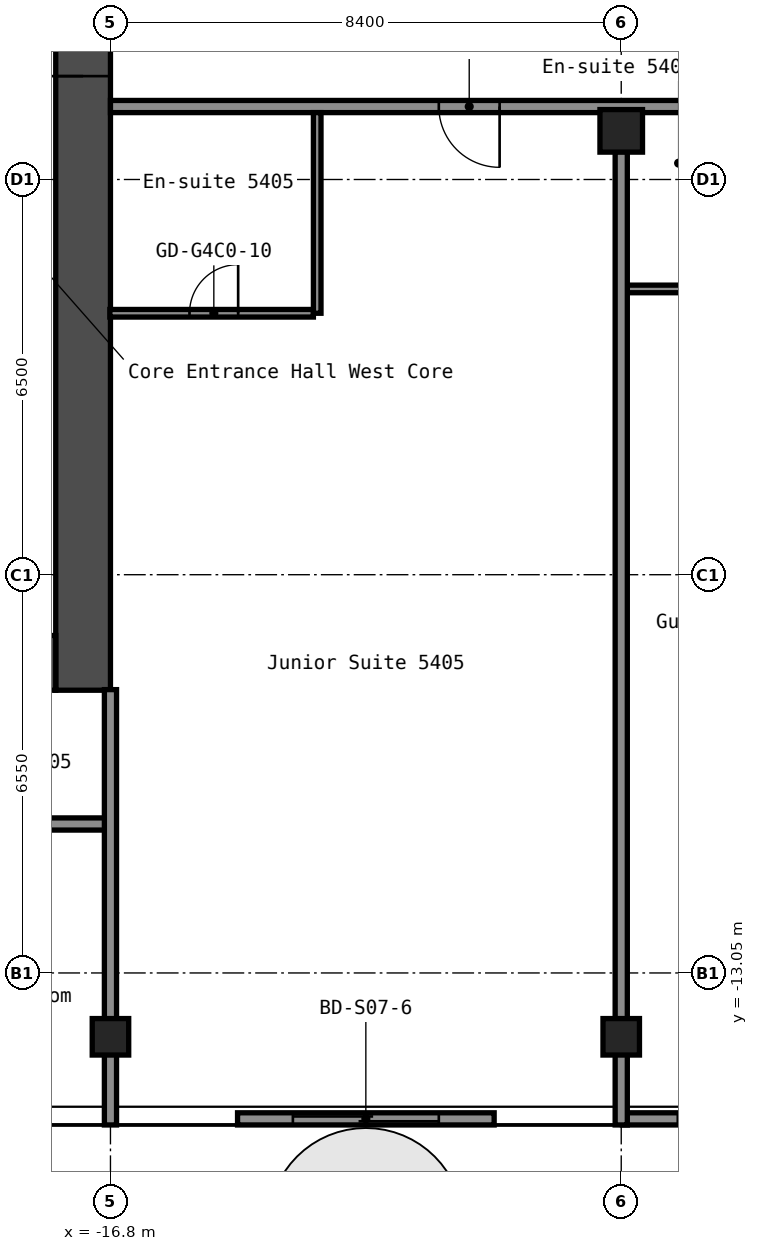
"""IFC4 building model, lengths in metres.
Left out: names, types, materials, properties, quantities, classifications, styles, units other than length and angle.
Written with IfcOpenShell. Run it as: python <this file> out.ifc"""

import sys

from ifc_helpers import new_model, si_unit, direction, frame, frame_2d, origin, origin_2d, place, context, subcontext, project, spatial, rectangle, hollow_rectangle, extrude, element, fill, save


model = new_model("IFC4")
c1 = context("Model", 3, precision=1e-05, world=origin(), true_north=direction((0.0, 1.0)))
c2 = subcontext(c1, "Body", "Model", "MODEL_VIEW")
j1 = project(units=[si_unit("LENGTHUNIT", "METRE"), si_unit("PLANEANGLEUNIT", "RADIAN")], contexts=[c1])
p1 = place(None, origin())
s1 = spatial("IfcSite", under=j1, at=p1, CompositionType="ELEMENT")
p2 = place(p1, origin())
s2 = spatial("IfcBuilding", under=s1, at=p2, CompositionType="ELEMENT")
p3 = place(p2, frame((0.0, 0.0, 193.0)))
s3 = spatial("IfcBuildingStorey", under=s2, at=p3, CompositionType="ELEMENT", Elevation=193.0)
for number, where, z_axis, x_axis in (
    (1, (-16.8, -14.1, 0.0), (0.0, 0.0, 1.0), (1.0, 0.0, 0.0)),
    (2, (-8.4, -14.1, 0.0), (0.0, 0.0, 1.0), (1.0, 0.0, 0.0)),
):
    element("IfcColumn", number, at=place(p3, frame(where, z_axis=z_axis, x_axis=x_axis)), inside=s3, PredefinedType="COLUMN", context=c2, shape_type="SweptSolid", body=[
        extrude(hollow_rectangle(XDim=0.6, YDim=0.6, WallThickness=0.025, InnerFilletRadius=0.038, OuterFilletRadius=0.062, at=origin_2d()), origin(), (0.0, 0.0, 1.0), 2.75),
    ])
p4 = place(p3, frame((-8.4, 0.8, 0.0), z_axis=(0.0, 0.0, 1.0), x_axis=(1.0, 0.0, 0.0)))
e3 = element("IfcColumn", 3, at=p4, inside=s3, PredefinedType="COLUMN", context=c2, shape_type="SweptSolid", body=[
    extrude(hollow_rectangle(XDim=0.7, YDim=0.7, WallThickness=0.028, at=origin_2d()), origin(), (0.0, 0.0, 1.0), 2.75),
])
p5 = place(p3, frame((-17.25, -8.4, 0.0), z_axis=(0.0, 0.0, 1.0), x_axis=(0.0, 1.0, 0.0)))
e4 = element("IfcWall", 4, at=p5, inside=s3, PredefinedType="SHEAR", context=c2, shape_type="SweptSolid", body=[
    extrude(rectangle(XDim=16.8, YDim=0.9, at=frame_2d((8.4, 0.0))), origin(), (0.0, 0.0, 1.0), 2.75),
])
p6 = place(p5, frame((10.1, 0.0, 0.0)))
e5 = element("IfcOpeningElement", 5, at=p6, cuts=e4, PredefinedType="OPENING", context=c2, shape_type="SweptSolid", body=[
    extrude(rectangle(XDim=1.6, YDim=2.1, at=frame_2d((0.8, 1.05))), frame((0.0, 0.46, 0.0), z_axis=(0.0, -1.0, 0.0), x_axis=(1.0, 0.0, 0.0)), (0.0, 0.0, 1.0), 0.92),
])
p7 = place(p3, frame((-32.7, -7.95, 0.0), z_axis=(0.0, 0.0, 1.0), x_axis=(1.0, 0.0, 0.0)))
e6 = element("IfcWall", 6, at=p7, inside=s3, PredefinedType="SHEAR", context=c2, shape_type="SweptSolid", body=[
    extrude(rectangle(XDim=15.0, YDim=0.9, at=frame_2d((7.5, 0.0))), origin(), (0.0, 0.0, 1.0), 2.75),
])
p8 = place(p7, frame((11.45, 0.0, 0.0)))
e7 = element("IfcOpeningElement", 7, at=p8, cuts=e6, PredefinedType="OPENING", context=c2, shape_type="SweptSolid", body=[
    extrude(rectangle(XDim=1.0, YDim=2.1, at=frame_2d((0.5, 1.05))), frame((0.0, 0.46, 0.0), z_axis=(0.0, -1.0, 0.0), x_axis=(1.0, 0.0, 0.0)), (0.0, 0.0, 1.0), 0.92),
])
p9 = place(p3, frame((-38.1, -10.6, 0.0), z_axis=(0.0, 0.0, 1.0), x_axis=(1.0, 0.0, 0.0)))
e8 = element("IfcWall", 8, at=p9, inside=s3, PredefinedType="PARTITIONING", context=c2, shape_type="SweptSolid", body=[
    extrude(rectangle(XDim=21.3, YDim=0.2, at=frame_2d((10.65, 0.0))), origin(), (0.0, 0.0, 1.0), 2.75),
])
p10 = place(p9, frame((1.95, 0.0, 0.0)))
e9 = element("IfcOpeningElement", 9, at=p10, cuts=e8, PredefinedType="OPENING", context=c2, shape_type="SweptSolid", body=[
    extrude(rectangle(XDim=0.9, YDim=2.1, at=frame_2d((0.45, 1.05))), frame((0.0, 0.11, 0.0), z_axis=(0.0, -1.0, 0.0), x_axis=(1.0, 0.0, 0.0)), (0.0, 0.0, 1.0), 0.22),
])
p11 = place(p9, frame((5.815, 0.0, 0.0)))
e10 = element("IfcOpeningElement", 10, at=p11, cuts=e8, PredefinedType="OPENING", context=c2, shape_type="SweptSolid", body=[
    extrude(rectangle(XDim=0.9, YDim=2.1, at=frame_2d((0.45, 1.05))), frame((0.0, 0.11, 0.0), z_axis=(0.0, -1.0, 0.0), x_axis=(1.0, 0.0, 0.0)), (0.0, 0.0, 1.0), 0.22),
])
p12 = place(p9, frame((10.015, 0.0, 0.0)))
e11 = element("IfcOpeningElement", 11, at=p12, cuts=e8, PredefinedType="OPENING", context=c2, shape_type="SweptSolid", body=[
    extrude(rectangle(XDim=0.9, YDim=2.1, at=frame_2d((0.45, 1.05))), frame((0.0, 0.11, 0.0), z_axis=(0.0, -1.0, 0.0), x_axis=(1.0, 0.0, 0.0)), (0.0, 0.0, 1.0), 0.22),
])
p13 = place(p9, frame((15.055, 0.0, 0.0)))
e12 = element("IfcOpeningElement", 12, at=p13, cuts=e8, PredefinedType="OPENING", context=c2, shape_type="SweptSolid", body=[
    extrude(rectangle(XDim=0.9, YDim=2.1, at=frame_2d((0.45, 1.05))), frame((0.0, 0.11, 0.0), z_axis=(0.0, -1.0, 0.0), x_axis=(1.0, 0.0, 0.0)), (0.0, 0.0, 1.0), 0.22),
])
p14 = place(p9, frame((19.255, 0.0, 0.0)))
e13 = element("IfcOpeningElement", 13, at=p14, cuts=e8, PredefinedType="OPENING", context=c2, shape_type="SweptSolid", body=[
    extrude(rectangle(XDim=0.9, YDim=2.1, at=frame_2d((0.45, 1.05))), frame((0.0, 0.11, 0.0), z_axis=(0.0, -1.0, 0.0), x_axis=(1.0, 0.0, 0.0)), (0.0, 0.0, 1.0), 0.22),
])
p15 = place(p3, frame((-16.81, -2.2, 0.0), z_axis=(0.0, 0.0, 1.0), x_axis=(1.0, 0.0, 0.0)))
e14 = element("IfcWall", 14, at=p15, inside=s3, PredefinedType="PARTITIONING", context=c2, shape_type="SweptSolid", body=[
    extrude(rectangle(XDim=3.348, YDim=0.125, at=frame_2d((1.674, 0.0))), origin(), (0.0, 0.0, 1.0), 2.75),
])
p16 = place(p15, frame((1.31, 0.0, 0.0)))
e15 = element("IfcOpeningElement", 15, at=p16, cuts=e14, PredefinedType="OPENING", context=c2, shape_type="SweptSolid", body=[
    extrude(rectangle(XDim=0.8, YDim=2.1, at=frame_2d((0.4, 1.05))), frame((0.0, 0.073, 0.0), z_axis=(0.0, -1.0, 0.0), x_axis=(1.0, 0.0, 0.0)), (0.0, 0.0, 1.0), 0.145),
])
p17 = place(p3, frame((-8.3, -1.8, 0.0), z_axis=(0.0, 0.0, 1.0), x_axis=(1.0, 0.0, 0.0)))
e16 = element("IfcWall", 16, at=p17, inside=s3, PredefinedType="PARTITIONING", context=c2, shape_type="SweptSolid", body=[
    extrude(rectangle(XDim=2.338, YDim=0.125, at=frame_2d((1.169, 0.0))), origin(), (0.0, 0.0, 1.0), 2.75),
])
p18 = place(p3, frame((-16.8, 1.2, 0.0), z_axis=(0.0, 0.0, 1.0), x_axis=(1.0, 0.0, 0.0)))
e17 = element("IfcWall", 17, at=p18, inside=s3, PredefinedType="PARTITIONING", context=c2, shape_type="SweptSolid", body=[
    extrude(rectangle(XDim=33.6, YDim=0.2, at=frame_2d((16.8, 0.0))), origin(), (0.0, 0.0, 1.0), 2.75),
])
p19 = place(p18, frame((5.4, 0.0, 0.0)))
e18 = element("IfcOpeningElement", 18, at=p19, cuts=e17, PredefinedType="OPENING", context=c2, shape_type="SweptSolid", body=[
    extrude(rectangle(XDim=1.0, YDim=2.1, at=frame_2d((0.5, 1.05))), frame((0.0, 0.11, 0.0), z_axis=(0.0, -1.0, 0.0), x_axis=(1.0, 0.0, 0.0)), (0.0, 0.0, 1.0), 0.22),
])
p20 = place(p18, frame((11.25, 0.0, 0.0)))
e19 = element("IfcOpeningElement", 19, at=p20, cuts=e17, PredefinedType="OPENING", context=c2, shape_type="SweptSolid", body=[
    extrude(rectangle(XDim=1.0, YDim=2.1, at=frame_2d((0.5, 1.05))), frame((0.0, 0.11, 0.0), z_axis=(0.0, -1.0, 0.0), x_axis=(1.0, 0.0, 0.0)), (0.0, 0.0, 1.0), 0.22),
])
p21 = place(p18, frame((12.95, 0.0, 0.0)))
e20 = element("IfcOpeningElement", 20, at=p21, cuts=e17, PredefinedType="OPENING", context=c2, shape_type="SweptSolid", body=[
    extrude(rectangle(XDim=1.0, YDim=2.1, at=frame_2d((0.5, 1.05))), frame((0.0, 0.11, 0.0), z_axis=(0.0, -1.0, 0.0), x_axis=(1.0, 0.0, 0.0)), (0.0, 0.0, 1.0), 0.22),
])
p22 = place(p18, frame((18.7, 0.0, 0.0)))
e21 = element("IfcOpeningElement", 21, at=p22, cuts=e17, PredefinedType="OPENING", context=c2, shape_type="SweptSolid", body=[
    extrude(rectangle(XDim=0.9, YDim=2.1, at=frame_2d((0.45, 1.05))), frame((0.0, 0.11, 0.0), z_axis=(0.0, -1.0, 0.0), x_axis=(1.0, 0.0, 0.0)), (0.0, 0.0, 1.0), 0.22),
])
p23 = place(p18, frame((22.9, 0.0, 0.0)))
e22 = element("IfcOpeningElement", 22, at=p23, cuts=e17, PredefinedType="OPENING", context=c2, shape_type="SweptSolid", body=[
    extrude(rectangle(XDim=0.9, YDim=2.1, at=frame_2d((0.45, 1.05))), frame((0.0, 0.11, 0.0), z_axis=(0.0, -1.0, 0.0), x_axis=(1.0, 0.0, 0.0)), (0.0, 0.0, 1.0), 0.22),
])
p24 = place(p18, frame((28.05, 0.0, 0.0)))
e23 = element("IfcOpeningElement", 23, at=p24, cuts=e17, PredefinedType="OPENING", context=c2, shape_type="SweptSolid", body=[
    extrude(rectangle(XDim=1.0, YDim=2.1, at=frame_2d((0.5, 1.05))), frame((0.0, 0.11, 0.0), z_axis=(0.0, -1.0, 0.0), x_axis=(1.0, 0.0, 0.0)), (0.0, 0.0, 1.0), 0.22),
])
p25 = place(p18, frame((29.75, 0.0, 0.0)))
e24 = element("IfcOpeningElement", 24, at=p25, cuts=e17, PredefinedType="OPENING", context=c2, shape_type="SweptSolid", body=[
    extrude(rectangle(XDim=1.0, YDim=2.1, at=frame_2d((0.5, 1.05))), frame((0.0, 0.11, 0.0), z_axis=(0.0, -1.0, 0.0), x_axis=(1.0, 0.0, 0.0)), (0.0, 0.0, 1.0), 0.22),
])
p26 = place(p3, frame((-16.8, -15.55, 0.0), z_axis=(0.0, 0.0, 1.0), x_axis=(0.0, 1.0, 0.0)))
e25 = element("IfcWall", 25, at=p26, inside=s3, PredefinedType="PARTITIONING", context=c2, shape_type="SweptSolid", body=[
    extrude(rectangle(XDim=7.16, YDim=0.2, at=frame_2d((3.58, 0.0))), origin(), (0.0, 0.0, 1.0), 2.75),
])
p27 = place(p3, frame((-13.4, -2.2, 0.0), z_axis=(0.0, 0.0, 1.0), x_axis=(0.0, 1.0, 0.0)))
e26 = element("IfcWall", 26, at=p27, inside=s3, PredefinedType="PARTITIONING", context=c2, shape_type="SweptSolid", body=[
    extrude(rectangle(XDim=3.3, YDim=0.125, at=frame_2d((1.65, 0.0))), origin(), (0.0, 0.0, 1.0), 2.75),
])
p28 = place(p3, frame((-8.4, -15.55, 0.0), z_axis=(0.0, 0.0, 1.0), x_axis=(0.0, 1.0, 0.0)))
e27 = element("IfcWall", 27, at=p28, inside=s3, PredefinedType="PARTITIONING", context=c2, shape_type="SweptSolid", body=[
    extrude(rectangle(XDim=16.01, YDim=0.2, at=frame_2d((8.005, 0.0))), origin(), (0.0, 0.0, 1.0), 2.75),
])
p29 = place(p3, frame((-14.71, -15.45, 0.0), z_axis=(0.0, 0.0, 1.0), x_axis=(1.0, 0.0, 0.0)))
p30 = place(p29, frame((0.91, 0.0, 0.0)))
p31 = place(p30, frame((2.4, 0.0, 0.0), z_axis=(0.0, 0.0, 1.0), x_axis=(-1.0, 0.0, 0.0)))
e28 = element("IfcDoor", 28, at=p31, inside=s3, OperationType="SLIDING_TO_LEFT", PredefinedType="DOOR", context=c2, shape_type="SweptSolid", body=[
    extrude(rectangle(XDim=2.4, YDim=2.2, at=frame_2d((1.2, 1.1))), frame((0.0, 0.025, 0.0), z_axis=(0.0, -1.0, 0.0), x_axis=(1.0, 0.0, 0.0)), (0.0, 0.0, 1.0), 0.05),
])
p32 = place(p3, frame((-8.38, -15.45, 0.0), z_axis=(0.0, 0.0, 1.0), x_axis=(1.0, 0.0, 0.0)))
p33 = place(p32, frame((0.91, 0.0, 0.0)))
p34 = place(p33, frame((2.4, 0.0, 0.0), z_axis=(0.0, 0.0, 1.0), x_axis=(-1.0, 0.0, 0.0)))
e29 = element("IfcDoor", 29, at=p34, inside=s3, OperationType="SLIDING_TO_LEFT", PredefinedType="DOOR", context=c2, shape_type="SweptSolid", body=[
    extrude(rectangle(XDim=2.4, YDim=2.2, at=frame_2d((1.2, 1.1))), frame((0.0, 0.025, 0.0), z_axis=(0.0, -1.0, 0.0), x_axis=(1.0, 0.0, 0.0)), (0.0, 0.0, 1.0), 0.05),
])
p35 = place(p6, origin())
e30 = element("IfcDoor", 30, at=p35, inside=s3, OperationType="DOUBLE_DOOR_SINGLE_SWING", PredefinedType="DOOR", context=c2, shape_type="SweptSolid", body=[
    extrude(rectangle(XDim=1.6, YDim=2.1, at=frame_2d((0.8, 1.05))), frame((0.0, 0.025, 0.0), z_axis=(0.0, -1.0, 0.0), x_axis=(1.0, 0.0, 0.0)), (0.0, 0.0, 1.0), 0.05),
])
fill(e5, e30)
p36 = place(p16, origin())
e31 = element("IfcDoor", 31, at=p36, inside=s3, OperationType="SINGLE_SWING_LEFT", PredefinedType="DOOR", context=c2, shape_type="SweptSolid", body=[
    extrude(rectangle(XDim=0.8, YDim=2.1, at=frame_2d((0.4, 1.05))), frame((0.0, 0.025, 0.0), z_axis=(0.0, -1.0, 0.0), x_axis=(1.0, 0.0, 0.0)), (0.0, 0.0, 1.0), 0.05),
])
fill(e15, e31)
p37 = place(p19, origin())
e32 = element("IfcDoor", 32, at=p37, inside=s3, OperationType="SINGLE_SWING_RIGHT", PredefinedType="DOOR", context=c2, shape_type="SweptSolid", body=[
    extrude(rectangle(XDim=1.0, YDim=2.1, at=frame_2d((0.5, 1.05))), frame((0.0, 0.025, 0.0), z_axis=(0.0, -1.0, 0.0), x_axis=(1.0, 0.0, 0.0)), (0.0, 0.0, 1.0), 0.05),
])
fill(e18, e32)
save(model, sys.argv[1])
